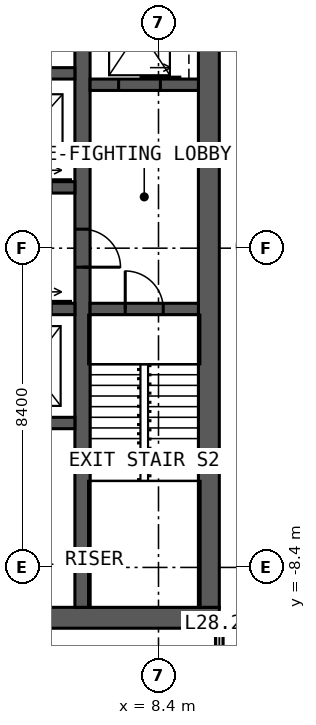
"""IFC4 building model, lengths in metres.
Left out: names, types, materials, properties, quantities, classifications, styles, units other than length and angle.
Written with IfcOpenShell. Run it as: python <this file> out.ifc"""

import sys

from ifc_helpers import new_model, si_unit, direction, frame, frame_2d, origin, place, context, subcontext, project, spatial, rectangle, extrude, element, fill, save


model = new_model("IFC4")
c1 = context("Model", 3, precision=1e-05, world=origin(), true_north=direction((0.0, 1.0)))
c2 = subcontext(c1, "Body", "Model", "MODEL_VIEW")
j1 = project(units=[si_unit("LENGTHUNIT", "METRE"), si_unit("PLANEANGLEUNIT", "RADIAN")], contexts=[c1])
p1 = place(None, origin())
s1 = spatial("IfcSite", under=j1, at=p1, CompositionType="ELEMENT")
p2 = place(p1, origin())
s2 = spatial("IfcBuilding", under=s1, at=p2, CompositionType="ELEMENT")
p3 = place(p2, frame((0.0, 0.0, 118.0)))
s3 = spatial("IfcBuildingStorey", under=s2, at=p3, CompositionType="ELEMENT", Elevation=118.0)
p4 = place(p3, frame((10.0, -9.725, 0.0), z_axis=(0.0, 0.0, 1.0), x_axis=(-1.0, 0.0, 0.0)))
e1 = element("IfcWall", 1, at=p4, inside=s3, PredefinedType="SOLIDWALL", context=c2, shape_type="SweptSolid", body=[
    extrude(rectangle(XDim=20.0, YDim=0.55, at=frame_2d((10.0, 0.0))), origin(), (0.0, 0.0, 1.0), 4.0),
])
p5 = place(p4, frame((6.875, 0.0, 0.0)))
e2 = element("IfcOpeningElement", 2, at=p5, cuts=e1, PredefinedType="OPENING", context=c2, shape_type="SweptSolid", body=[
    extrude(rectangle(XDim=1.2, YDim=2.2, at=frame_2d((0.6, 1.1))), frame((0.0, 0.285, 0.0), z_axis=(0.0, -1.0, 0.0), x_axis=(1.0, 0.0, 0.0)), (0.0, 0.0, 1.0), 0.57),
])
p6 = place(p3, frame((9.725, -9.45, 0.0), z_axis=(0.0, 0.0, 1.0), x_axis=(0.0, 1.0, 0.0)))
e3 = element("IfcWall", 3, at=p6, inside=s3, PredefinedType="SOLIDWALL", context=c2, shape_type="SweptSolid", body=[
    extrude(rectangle(XDim=18.9, YDim=0.55, at=frame_2d((9.45, 0.0))), origin(), (0.0, 0.0, 1.0), 4.0),
])
p7 = place(p3, frame((6.4, 9.45, 0.0), z_axis=(0.0, 0.0, 1.0), x_axis=(0.0, -1.0, 0.0)))
e4 = element("IfcWall", 4, at=p7, inside=s3, PredefinedType="SOLIDWALL", context=c2, shape_type="SweptSolid", body=[
    extrude(rectangle(XDim=18.9, YDim=0.4, at=frame_2d((9.45, 0.0))), origin(), (0.0, 0.0, 1.0), 4.0),
])
p8 = place(p7, frame((8.95, 0.0, 0.0)))
e5 = element("IfcOpeningElement", 5, at=p8, cuts=e4, PredefinedType="OPENING", context=c2, shape_type="SweptSolid", body=[
    extrude(rectangle(XDim=1.0, YDim=2.2, at=frame_2d((0.5, 1.1))), frame((0.0, 0.21, 0.0), z_axis=(0.0, -1.0, 0.0), x_axis=(1.0, 0.0, 0.0)), (0.0, 0.0, 1.0), 0.42),
])
p9 = place(p3, frame((1.35, 1.6, 0.0), z_axis=(0.0, 0.0, 1.0), x_axis=(1.0, 0.0, 0.0)))
e6 = element("IfcWall", 6, at=p9, inside=s3, PredefinedType="SOLIDWALL", context=c2, shape_type="SweptSolid", body=[
    extrude(rectangle(XDim=4.85, YDim=0.3, at=frame_2d((2.425, 0.0))), origin(), (0.0, 0.0, 1.0), 4.0),
])
p10 = place(p9, frame((0.6, 0.0, 0.0)))
e7 = element("IfcOpeningElement", 7, at=p10, cuts=e6, PredefinedType="OPENING", context=c2, shape_type="SweptSolid", body=[
    extrude(rectangle(XDim=1.1, YDim=2.2, at=frame_2d((0.55, 1.1))), frame((0.0, 0.16, 0.0), z_axis=(0.0, -1.0, 0.0), x_axis=(1.0, 0.0, 0.0)), (0.0, 0.0, 1.0), 0.32),
])
p11 = place(p9, frame((3.125, 0.0, 0.0)))
e8 = element("IfcOpeningElement", 8, at=p11, cuts=e6, PredefinedType="OPENING", context=c2, shape_type="SweptSolid", body=[
    extrude(rectangle(XDim=1.1, YDim=2.2, at=frame_2d((0.55, 1.1))), frame((0.0, 0.16, 0.0), z_axis=(0.0, -1.0, 0.0), x_axis=(1.0, 0.0, 0.0)), (0.0, 0.0, 1.0), 0.32),
])
p12 = place(p3, frame((1.35, 4.6, 0.0), z_axis=(0.0, 0.0, 1.0), x_axis=(1.0, 0.0, 0.0)))
e9 = element("IfcWall", 9, at=p12, inside=s3, PredefinedType="SOLIDWALL", context=c2, shape_type="SweptSolid", body=[
    extrude(rectangle(XDim=4.85, YDim=0.3, at=frame_2d((2.425, 0.0))), origin(), (0.0, 0.0, 1.0), 4.0),
])
p13 = place(p3, frame((3.85, -1.6, 0.0), z_axis=(0.0, 0.0, 1.0), x_axis=(1.0, 0.0, 0.0)))
e10 = element("IfcWall", 10, at=p13, inside=s3, PredefinedType="SOLIDWALL", context=c2, shape_type="SweptSolid", body=[
    extrude(rectangle(XDim=2.35, YDim=0.3, at=frame_2d((1.175, 0.0))), origin(), (0.0, 0.0, 1.0), 4.0),
])
p14 = place(p13, frame((0.625, 0.0, 0.0)))
e11 = element("IfcOpeningElement", 11, at=p14, cuts=e10, PredefinedType="OPENING", context=c2, shape_type="SweptSolid", body=[
    extrude(rectangle(XDim=1.1, YDim=2.2, at=frame_2d((0.55, 1.1))), frame((0.0, 0.16, 0.0), z_axis=(0.0, -1.0, 0.0), x_axis=(1.0, 0.0, 0.0)), (0.0, 0.0, 1.0), 0.32),
])
p15 = place(p3, frame((3.85, -4.6, 0.0), z_axis=(0.0, 0.0, 1.0), x_axis=(1.0, 0.0, 0.0)))
e12 = element("IfcWall", 12, at=p15, inside=s3, PredefinedType="SOLIDWALL", context=c2, shape_type="SweptSolid", body=[
    extrude(rectangle(XDim=2.35, YDim=0.3, at=frame_2d((1.175, 0.0))), origin(), (0.0, 0.0, 1.0), 4.0),
])
p16 = place(p3, frame((6.6, -1.6, 0.0), z_axis=(0.0, 0.0, 1.0), x_axis=(1.0, 0.0, 0.0)))
e13 = element("IfcWall", 13, at=p16, inside=s3, PredefinedType="SOLIDWALL", context=c2, shape_type="SweptSolid", body=[
    extrude(rectangle(XDim=2.85, YDim=0.3, at=frame_2d((1.425, 0.0))), origin(), (0.0, 0.0, 1.0), 4.0),
])
p17 = place(p16, frame((0.925, 0.0, 0.0)))
e14 = element("IfcOpeningElement", 14, at=p17, cuts=e13, PredefinedType="OPENING", context=c2, shape_type="SweptSolid", body=[
    extrude(rectangle(XDim=1.0, YDim=2.2, at=frame_2d((0.5, 1.1))), frame((0.0, 0.16, 0.0), z_axis=(0.0, -1.0, 0.0), x_axis=(1.0, 0.0, 0.0)), (0.0, 0.0, 1.0), 0.32),
])
p18 = place(p3, frame((6.6, 4.3, 0.0), z_axis=(0.0, 0.0, 1.0), x_axis=(1.0, 0.0, 0.0)))
e15 = element("IfcWall", 15, at=p18, inside=s3, PredefinedType="SOLIDWALL", context=c2, shape_type="SweptSolid", body=[
    extrude(rectangle(XDim=2.85, YDim=0.3, at=frame_2d((1.425, 0.0))), origin(), (0.0, 0.0, 1.0), 4.0),
])
p19 = place(p18, frame((0.75, 0.0, 0.0)))
e16 = element("IfcOpeningElement", 16, at=p19, cuts=e15, PredefinedType="OPENING", context=c2, shape_type="SweptSolid", body=[
    extrude(rectangle(XDim=1.1, YDim=2.2, at=frame_2d((0.55, 1.1))), frame((0.0, 0.16, 0.0), z_axis=(0.0, -1.0, 0.0), x_axis=(1.0, 0.0, 0.0)), (0.0, 0.0, 1.0), 0.32),
])
p20 = place(p3, frame((10.0, -10.0, 0.0), z_axis=(0.0, 0.0, 1.0), x_axis=(0.0, -1.0, 0.0)))
e17 = element("IfcWall", 17, at=p20, inside=s3, PredefinedType="PARTITIONING", context=c2, shape_type="SweptSolid", body=[
    extrude(rectangle(XDim=2.0, YDim=0.2, at=frame_2d((1.0, 0.0))), origin(), (0.0, 0.0, 1.0), 3.8),
])
p21 = place(p20, frame((0.5, 0.0, 0.0)))
e18 = element("IfcOpeningElement", 18, at=p21, cuts=e17, PredefinedType="OPENING", context=c2, shape_type="SweptSolid", body=[
    extrude(rectangle(XDim=1.0, YDim=2.2, at=frame_2d((0.5, 1.1))), frame((0.0, 0.11, 0.0), z_axis=(0.0, -1.0, 0.0), x_axis=(1.0, 0.0, 0.0)), (0.0, 0.0, 1.0), 0.22),
])
p22 = place(p8, origin())
e19 = element("IfcDoor", 19, at=p22, inside=s3, OperationType="SINGLE_SWING_RIGHT", PredefinedType="DOOR", context=c2, shape_type="SweptSolid", body=[
    extrude(rectangle(XDim=1.0, YDim=2.2, at=frame_2d((0.5, 1.1))), frame((0.0, 0.025, 0.0), z_axis=(0.0, -1.0, 0.0), x_axis=(1.0, 0.0, 0.0)), (0.0, 0.0, 1.0), 0.05),
])
fill(e5, e19)
p23 = place(p17, origin())
e20 = element("IfcDoor", 20, at=p23, inside=s3, OperationType="SINGLE_SWING_LEFT", PredefinedType="DOOR", context=c2, shape_type="SweptSolid", body=[
    extrude(rectangle(XDim=1.0, YDim=2.2, at=frame_2d((0.5, 1.1))), frame((0.0, 0.025, 0.0), z_axis=(0.0, -1.0, 0.0), x_axis=(1.0, 0.0, 0.0)), (0.0, 0.0, 1.0), 0.05),
])
fill(e14, e20)
p24 = place(p19, origin())
e21 = element("IfcDoor", 21, at=p24, inside=s3, OperationType="SLIDING_TO_LEFT", PredefinedType="DOOR", context=c2, shape_type="SweptSolid", body=[
    extrude(rectangle(XDim=1.1, YDim=2.2, at=frame_2d((0.55, 1.1))), frame((0.0, 0.025, 0.0), z_axis=(0.0, -1.0, 0.0), x_axis=(1.0, 0.0, 0.0)), (0.0, 0.0, 1.0), 0.05),
])
fill(e16, e21)
save(model, sys.argv[1])
